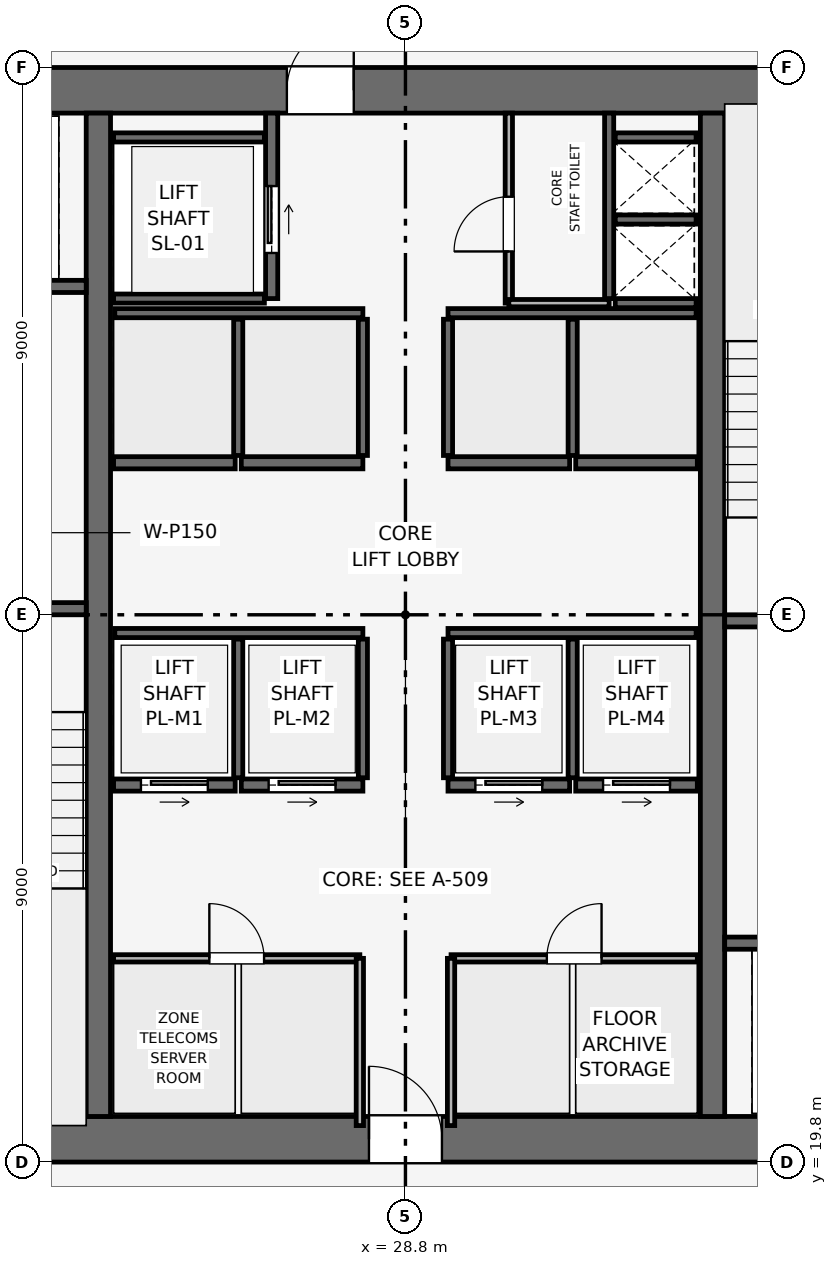
"""IFC4 building model, lengths in metres.
Left out: names, types, materials, properties, quantities, classifications, styles, units other than length and angle.
Written with IfcOpenShell. Run it as: python <this file> out.ifc"""

import sys

from ifc_helpers import new_model, si_unit, direction, frame, frame_2d, origin, place, context, subcontext, project, spatial, rectangle, extrude, element, fill, save


model = new_model("IFC4")
c1 = context("Model", 3, precision=1e-05, world=origin(), true_north=direction((0.0, 1.0)))
c2 = subcontext(c1, "Body", "Model", "MODEL_VIEW")
j1 = project(units=[si_unit("LENGTHUNIT", "METRE"), si_unit("PLANEANGLEUNIT", "RADIAN")], contexts=[c1])
p1 = place(None, origin())
s1 = spatial("IfcSite", under=j1, at=p1, CompositionType="ELEMENT")
p2 = place(p1, origin())
s2 = spatial("IfcBuilding", under=s1, at=p2, CompositionType="ELEMENT")
p3 = place(p2, frame((0.0, 0.0, 207.45)))
s3 = spatial("IfcBuildingStorey", under=s2, at=p3, CompositionType="ELEMENT", Elevation=207.45)
p4 = place(p3, frame((19.8, 20.175, 0.0), z_axis=(0.0, 0.0, 1.0), x_axis=(1.0, 0.0, 0.0)))
e1 = element("IfcWall", 1, at=p4, inside=s3, PredefinedType="SHEAR", context=c2, shape_type="SweptSolid", body=[
    extrude(rectangle(XDim=18.0, YDim=0.75, at=frame_2d((9.0, 0.0))), origin(), (0.0, 0.0, 1.0), 3.75),
])
p5 = place(p4, frame((8.4, 0.0, 0.0)))
e2 = element("IfcOpeningElement", 2, at=p5, cuts=e1, PredefinedType="OPENING", context=c2, shape_type="SweptSolid", body=[
    extrude(rectangle(XDim=1.2, YDim=2.2, at=frame_2d((0.6, 1.1))), frame((0.0, 0.385, 0.0), z_axis=(0.0, -1.0, 0.0), x_axis=(1.0, 0.0, 0.0)), (0.0, 0.0, 1.0), 0.77),
])
p6 = place(p3, frame((19.8, 37.425, 0.0), z_axis=(0.0, 0.0, 1.0), x_axis=(1.0, 0.0, 0.0)))
e3 = element("IfcWall", 3, at=p6, inside=s3, PredefinedType="SHEAR", context=c2, shape_type="SweptSolid", body=[
    extrude(rectangle(XDim=18.0, YDim=0.75, at=frame_2d((9.0, 0.0))), origin(), (0.0, 0.0, 1.0), 3.75),
])
p7 = place(p6, frame((7.05, 0.0, 0.0)))
e4 = element("IfcOpeningElement", 4, at=p7, cuts=e3, PredefinedType="OPENING", context=c2, shape_type="SweptSolid", body=[
    extrude(rectangle(XDim=1.1, YDim=2.15, at=frame_2d((0.55, 1.075))), frame((0.0, 0.385, 0.0), z_axis=(0.0, -1.0, 0.0), x_axis=(1.0, 0.0, 0.0)), (0.0, 0.0, 1.0), 0.77),
])
for number, where, z_axis, x_axis in (
    (5, (23.75, 20.55, 0.0), (0.0, 0.0, 1.0), (0.0, 1.0, 0.0)),
    (6, (33.85, 20.55, 0.0), (0.0, 0.0, 1.0), (0.0, 1.0, 0.0)),
):
    element("IfcWall", number, at=place(p3, frame(where, z_axis=z_axis, x_axis=x_axis)), inside=s3, PredefinedType="SHEAR", context=c2, shape_type="SweptSolid", body=[
        extrude(rectangle(XDim=16.5, YDim=0.4, at=frame_2d((8.25, 0.0))), origin(), (0.0, 0.0, 1.0), 3.75),
    ])
p8 = place(p3, frame((20.4, 28.9, 0.0), z_axis=(0.0, 0.0, 1.0), x_axis=(1.0, 0.0, 0.0)))
e7 = element("IfcWall", 7, at=p8, inside=s3, PredefinedType="SHEAR", context=c2, shape_type="SweptSolid", body=[
    extrude(rectangle(XDim=3.15, YDim=0.2, at=frame_2d((1.575, 0.0))), origin(), (0.0, 0.0, 1.0), 3.5),
])
p9 = place(p8, frame((0.8, 0.0, 0.0)))
e8 = element("IfcOpeningElement", 8, at=p9, cuts=e7, PredefinedType="OPENING", context=c2, shape_type="SweptSolid", body=[
    extrude(rectangle(XDim=1.0, YDim=2.1, at=frame_2d((0.5, 1.05))), frame((0.0, 0.11, 0.0), z_axis=(0.0, -1.0, 0.0), x_axis=(1.0, 0.0, 0.0)), (0.0, 0.0, 1.0), 0.22),
])
p10 = place(p3, frame((34.05, 28.7, 0.0), z_axis=(0.0, 0.0, 1.0), x_axis=(1.0, 0.0, 0.0)))
e9 = element("IfcWall", 9, at=p10, inside=s3, PredefinedType="SHEAR", context=c2, shape_type="SweptSolid", body=[
    extrude(rectangle(XDim=3.15, YDim=0.2, at=frame_2d((1.575, 0.0))), origin(), (0.0, 0.0, 1.0), 3.5),
])
p11 = place(p10, frame((0.8, 0.0, 0.0)))
e10 = element("IfcOpeningElement", 10, at=p11, cuts=e9, PredefinedType="OPENING", context=c2, shape_type="SweptSolid", body=[
    extrude(rectangle(XDim=1.0, YDim=2.1, at=frame_2d((0.5, 1.05))), frame((0.0, 0.11, 0.0), z_axis=(0.0, -1.0, 0.0), x_axis=(1.0, 0.0, 0.0)), (0.0, 0.0, 1.0), 0.22),
])
p12 = place(p3, frame((32.15, 34.0, 0.0), z_axis=(0.0, 0.0, 1.0), x_axis=(0.0, 1.0, 0.0)))
e11 = element("IfcWall", 11, at=p12, inside=s3, PredefinedType="SHEAR", context=c2, shape_type="SweptSolid", body=[
    extrude(rectangle(XDim=3.05, YDim=0.15, at=frame_2d((1.525, 0.0))), origin(), (0.0, 0.0, 1.0), 3.5),
])
for number, where, z_axis, x_axis in (
    (12, (32.25, 33.925, 0.0), (0.0, 0.0, 1.0), (1.0, 0.0, 0.0)),
    (13, (32.25, 35.3, 0.0), (0.0, 0.0, 1.0), (1.0, 0.0, 0.0)),
):
    element("IfcWall", number, at=place(p3, frame(where, z_axis=z_axis, x_axis=x_axis)), inside=s3, PredefinedType="SHEAR", context=c2, shape_type="SweptSolid", body=[
        extrude(rectangle(XDim=1.33, YDim=0.15, at=frame_2d((0.665, 0.0))), origin(), (0.0, 0.0, 1.0), 3.5),
    ])
p13 = place(p3, frame((20.5, 34.2, 0.0), z_axis=(0.0, 0.0, 1.0), x_axis=(1.0, 0.0, 0.0)))
e14 = element("IfcWall", 14, at=p13, inside=s3, PredefinedType="SHEAR", context=c2, shape_type="SweptSolid", body=[
    extrude(rectangle(XDim=3.05, YDim=0.2, at=frame_2d((1.525, 0.0))), origin(), (0.0, 0.0, 1.0), 3.5),
])
p14 = place(p13, frame((0.75, 0.0, 0.0)))
e15 = element("IfcOpeningElement", 15, at=p14, cuts=e14, PredefinedType="OPENING", context=c2, shape_type="SweptSolid", body=[
    extrude(rectangle(XDim=1.1, YDim=2.15, at=frame_2d((0.55, 1.075))), frame((0.0, 0.11, 0.0), z_axis=(0.0, -1.0, 0.0), x_axis=(1.0, 0.0, 0.0)), (0.0, 0.0, 1.0), 0.22),
])
p15 = place(p3, frame((34.05, 23.4, 0.0), z_axis=(0.0, 0.0, 1.0), x_axis=(1.0, 0.0, 0.0)))
e16 = element("IfcWall", 16, at=p15, inside=s3, PredefinedType="SHEAR", context=c2, shape_type="SweptSolid", body=[
    extrude(rectangle(XDim=3.05, YDim=0.2, at=frame_2d((1.525, 0.0))), origin(), (0.0, 0.0, 1.0), 3.5),
])
p16 = place(p15, frame((1.2, 0.0, 0.0)))
e17 = element("IfcOpeningElement", 17, at=p16, cuts=e16, PredefinedType="OPENING", context=c2, shape_type="SweptSolid", body=[
    extrude(rectangle(XDim=1.1, YDim=2.15, at=frame_2d((0.55, 1.075))), frame((0.0, 0.11, 0.0), z_axis=(0.0, -1.0, 0.0), x_axis=(1.0, 0.0, 0.0)), (0.0, 0.0, 1.0), 0.22),
])
p17 = place(p3, frame((26.6, 34.0, 0.0), z_axis=(0.0, 0.0, 1.0), x_axis=(0.0, 1.0, 0.0)))
e18 = element("IfcWall", 18, at=p17, inside=s3, PredefinedType="SHEAR", context=c2, shape_type="SweptSolid", body=[
    extrude(rectangle(XDim=3.05, YDim=0.2, at=frame_2d((1.525, 0.0))), origin(), (0.0, 0.0, 1.0), 3.5),
])
p18 = place(p17, frame((0.75, 0.0, 0.0)))
e19 = element("IfcOpeningElement", 19, at=p18, cuts=e18, PredefinedType="OPENING", context=c2, shape_type="SweptSolid", body=[
    extrude(rectangle(XDim=1.1, YDim=2.15, at=frame_2d((0.55, 1.075))), frame((0.0, 0.11, 0.0), z_axis=(0.0, -1.0, 0.0), x_axis=(1.0, 0.0, 0.0)), (0.0, 0.0, 1.0), 0.22),
])
for number, where, z_axis, x_axis in (
    (20, (24.0, 34.0, 0.0), (0.0, 0.0, 1.0), (1.0, 0.0, 0.0)),
    (21, (24.0, 36.65, 0.0), (0.0, 0.0, 1.0), (1.0, 0.0, 0.0)),
):
    element("IfcWall", number, at=place(p3, frame(where, z_axis=z_axis, x_axis=x_axis)), inside=s3, PredefinedType="SHEAR", context=c2, shape_type="SweptSolid", body=[
        extrude(rectangle(XDim=2.48, YDim=0.15, at=frame_2d((1.24, 0.0))), origin(), (0.0, 0.0, 1.0), 3.5),
    ])
p19 = place(p3, frame((24.0, 26.0, 0.0), z_axis=(0.0, 0.0, 1.0), x_axis=(1.0, 0.0, 0.0)))
e22 = element("IfcWall", 22, at=p19, inside=s3, PredefinedType="SHEAR", context=c2, shape_type="SweptSolid", body=[
    extrude(rectangle(XDim=2.0, YDim=0.2, at=frame_2d((1.0, 0.0))), origin(), (0.0, 0.0, 1.0), 3.5),
])
p20 = place(p19, frame((0.45, 0.0, 0.0)))
e23 = element("IfcOpeningElement", 23, at=p20, cuts=e22, PredefinedType="OPENING", context=c2, shape_type="SweptSolid", body=[
    extrude(rectangle(XDim=1.1, YDim=2.15, at=frame_2d((0.55, 1.075))), frame((0.0, 0.11, 0.0), z_axis=(0.0, -1.0, 0.0), x_axis=(1.0, 0.0, 0.0)), (0.0, 0.0, 1.0), 0.22),
])
p21 = place(p3, frame((26.1, 26.0, 0.0), z_axis=(0.0, 0.0, 1.0), x_axis=(1.0, 0.0, 0.0)))
e24 = element("IfcWall", 24, at=p21, inside=s3, PredefinedType="SHEAR", context=c2, shape_type="SweptSolid", body=[
    extrude(rectangle(XDim=2.0, YDim=0.2, at=frame_2d((1.0, 0.0))), origin(), (0.0, 0.0, 1.0), 3.5),
])
p22 = place(p21, frame((0.45, 0.0, 0.0)))
e25 = element("IfcOpeningElement", 25, at=p22, cuts=e24, PredefinedType="OPENING", context=c2, shape_type="SweptSolid", body=[
    extrude(rectangle(XDim=1.1, YDim=2.15, at=frame_2d((0.55, 1.075))), frame((0.0, 0.11, 0.0), z_axis=(0.0, -1.0, 0.0), x_axis=(1.0, 0.0, 0.0)), (0.0, 0.0, 1.0), 0.22),
])
p23 = place(p3, frame((29.5, 26.0, 0.0), z_axis=(0.0, 0.0, 1.0), x_axis=(1.0, 0.0, 0.0)))
e26 = element("IfcWall", 26, at=p23, inside=s3, PredefinedType="SHEAR", context=c2, shape_type="SweptSolid", body=[
    extrude(rectangle(XDim=2.0, YDim=0.2, at=frame_2d((1.0, 0.0))), origin(), (0.0, 0.0, 1.0), 3.5),
])
p24 = place(p23, frame((0.45, 0.0, 0.0)))
e27 = element("IfcOpeningElement", 27, at=p24, cuts=e26, PredefinedType="OPENING", context=c2, shape_type="SweptSolid", body=[
    extrude(rectangle(XDim=1.1, YDim=2.15, at=frame_2d((0.55, 1.075))), frame((0.0, 0.11, 0.0), z_axis=(0.0, -1.0, 0.0), x_axis=(1.0, 0.0, 0.0)), (0.0, 0.0, 1.0), 0.22),
])
p25 = place(p3, frame((31.6, 26.0, 0.0), z_axis=(0.0, 0.0, 1.0), x_axis=(1.0, 0.0, 0.0)))
e28 = element("IfcWall", 28, at=p25, inside=s3, PredefinedType="SHEAR", context=c2, shape_type="SweptSolid", body=[
    extrude(rectangle(XDim=2.0, YDim=0.2, at=frame_2d((1.0, 0.0))), origin(), (0.0, 0.0, 1.0), 3.5),
])
p26 = place(p25, frame((0.45, 0.0, 0.0)))
e29 = element("IfcOpeningElement", 29, at=p26, cuts=e28, PredefinedType="OPENING", context=c2, shape_type="SweptSolid", body=[
    extrude(rectangle(XDim=1.1, YDim=2.15, at=frame_2d((0.55, 1.075))), frame((0.0, 0.11, 0.0), z_axis=(0.0, -1.0, 0.0), x_axis=(1.0, 0.0, 0.0)), (0.0, 0.0, 1.0), 0.22),
])
for number, where, z_axis, x_axis in (
    (30, (24.0, 31.3, 0.0), (0.0, 0.0, 1.0), (1.0, 0.0, 0.0)),
    (31, (26.1, 31.3, 0.0), (0.0, 0.0, 1.0), (1.0, 0.0, 0.0)),
    (32, (29.5, 31.3, 0.0), (0.0, 0.0, 1.0), (1.0, 0.0, 0.0)),
    (33, (31.6, 31.3, 0.0), (0.0, 0.0, 1.0), (1.0, 0.0, 0.0)),
):
    element("IfcWall", number, at=place(p3, frame(where, z_axis=z_axis, x_axis=x_axis)), inside=s3, PredefinedType="SHEAR", context=c2, shape_type="SweptSolid", body=[
        extrude(rectangle(XDim=2.0, YDim=0.2, at=frame_2d((1.0, 0.0))), origin(), (0.0, 0.0, 1.0), 3.5),
    ])
p27 = place(p3, frame((32.25, 36.65, 0.0), z_axis=(0.0, 0.0, 1.0), x_axis=(1.0, 0.0, 0.0)))
e34 = element("IfcWall", 34, at=p27, inside=s3, PredefinedType="SHEAR", context=c2, shape_type="SweptSolid", body=[
    extrude(rectangle(XDim=1.33, YDim=0.15, at=frame_2d((0.665, 0.0))), origin(), (0.0, 0.0, 1.0), 3.5),
])
for number, where, z_axis, x_axis in (
    (35, (24.02, 28.5, 0.0), (0.0, 0.0, 1.0), (1.0, 0.0, 0.0)),
    (36, (29.5, 28.5, 0.0), (0.0, 0.0, 1.0), (1.0, 0.0, 0.0)),
):
    element("IfcWall", number, at=place(p3, frame(where, z_axis=z_axis, x_axis=x_axis)), inside=s3, PredefinedType="SHEAR", context=c2, shape_type="SweptSolid", body=[
        extrude(rectangle(XDim=4.08, YDim=0.15, at=frame_2d((2.04, 0.0))), origin(), (0.0, 0.0, 1.0), 3.5),
    ])
for number, where, z_axis, x_axis in (
    (37, (26.05, 26.12, 0.0), (0.0, 0.0, 1.0), (0.0, 1.0, 0.0)),
    (38, (28.1, 26.12, 0.0), (0.0, 0.0, 1.0), (0.0, 1.0, 0.0)),
    (39, (29.5, 26.12, 0.0), (0.0, 0.0, 1.0), (0.0, 1.0, 0.0)),
    (40, (31.55, 26.12, 0.0), (0.0, 0.0, 1.0), (0.0, 1.0, 0.0)),
):
    element("IfcWall", number, at=place(p3, frame(where, z_axis=z_axis, x_axis=x_axis)), inside=s3, PredefinedType="SHEAR", context=c2, shape_type="SweptSolid", body=[
        extrude(rectangle(XDim=2.28, YDim=0.15, at=frame_2d((1.14, 0.0))), origin(), (0.0, 0.0, 1.0), 3.5),
    ])
for number, where, z_axis, x_axis in (
    (41, (24.02, 33.76, 0.0), (0.0, 0.0, 1.0), (1.0, 0.0, 0.0)),
    (42, (29.5, 33.76, 0.0), (0.0, 0.0, 1.0), (1.0, 0.0, 0.0)),
):
    element("IfcWall", number, at=place(p3, frame(where, z_axis=z_axis, x_axis=x_axis)), inside=s3, PredefinedType="SHEAR", context=c2, shape_type="SweptSolid", body=[
        extrude(rectangle(XDim=4.08, YDim=0.15, at=frame_2d((2.04, 0.0))), origin(), (0.0, 0.0, 1.0), 3.5),
    ])
for number, where, z_axis, x_axis in (
    (43, (26.05, 31.42, 0.0), (0.0, 0.0, 1.0), (0.0, 1.0, 0.0)),
    (44, (28.1, 31.42, 0.0), (0.0, 0.0, 1.0), (0.0, 1.0, 0.0)),
    (45, (29.5, 31.42, 0.0), (0.0, 0.0, 1.0), (0.0, 1.0, 0.0)),
    (46, (31.55, 31.42, 0.0), (0.0, 0.0, 1.0), (0.0, 1.0, 0.0)),
):
    element("IfcWall", number, at=place(p3, frame(where, z_axis=z_axis, x_axis=x_axis)), inside=s3, PredefinedType="SHEAR", context=c2, shape_type="SweptSolid", body=[
        extrude(rectangle(XDim=2.24, YDim=0.15, at=frame_2d((1.12, 0.0))), origin(), (0.0, 0.0, 1.0), 3.5),
    ])
p28 = place(p3, frame((30.5, 33.925, 0.0), z_axis=(0.0, 0.0, 1.0), x_axis=(0.0, 1.0, 0.0)))
e47 = element("IfcWall", 47, at=p28, inside=s3, PredefinedType="PARTITIONING", context=c2, shape_type="SweptSolid", body=[
    extrude(rectangle(XDim=3.125, YDim=0.12, at=frame_2d((1.562, 0.0))), origin(), (0.0, 0.0, 1.0), 3.5),
])
p29 = place(p28, frame((0.85, 0.0, 0.0)))
e48 = element("IfcOpeningElement", 48, at=p29, cuts=e47, PredefinedType="OPENING", context=c2, shape_type="SweptSolid", body=[
    extrude(rectangle(XDim=0.9, YDim=2.1, at=frame_2d((0.45, 1.05))), frame((0.0, 0.07, 0.0), z_axis=(0.0, -1.0, 0.0), x_axis=(1.0, 0.0, 0.0)), (0.0, 0.0, 1.0), 0.14),
])
p30 = place(p3, frame((30.5, 33.925, 0.0), z_axis=(0.0, 0.0, 1.0), x_axis=(1.0, 0.0, 0.0)))
e49 = element("IfcWall", 49, at=p30, inside=s3, PredefinedType="PARTITIONING", context=c2, shape_type="SweptSolid", body=[
    extrude(rectangle(XDim=1.65, YDim=0.12, at=frame_2d((0.825, 0.0))), origin(), (0.0, 0.0, 1.0), 3.5),
])
p31 = place(p3, frame((24.0, 23.15, 0.0), z_axis=(0.0, 0.0, 1.0), x_axis=(1.0, 0.0, 0.0)))
e50 = element("IfcWall", 50, at=p31, inside=s3, PredefinedType="PARTITIONING", context=c2, shape_type="SweptSolid", body=[
    extrude(rectangle(XDim=4.05, YDim=0.12, at=frame_2d((2.025, 0.0))), origin(), (0.0, 0.0, 1.0), 3.5),
])
p32 = place(p31, frame((1.575, 0.0, 0.0)))
e51 = element("IfcOpeningElement", 51, at=p32, cuts=e50, PredefinedType="OPENING", context=c2, shape_type="SweptSolid", body=[
    extrude(rectangle(XDim=0.9, YDim=2.1, at=frame_2d((0.45, 1.05))), frame((0.0, 0.07, 0.0), z_axis=(0.0, -1.0, 0.0), x_axis=(1.0, 0.0, 0.0)), (0.0, 0.0, 1.0), 0.14),
])
p33 = place(p3, frame((28.05, 20.4, 0.0), z_axis=(0.0, 0.0, 1.0), x_axis=(0.0, 1.0, 0.0)))
e52 = element("IfcWall", 52, at=p33, inside=s3, PredefinedType="PARTITIONING", context=c2, shape_type="SweptSolid", body=[
    extrude(rectangle(XDim=2.75, YDim=0.12, at=frame_2d((1.375, 0.0))), origin(), (0.0, 0.0, 1.0), 3.5),
])
p34 = place(p3, frame((29.55, 23.15, 0.0), z_axis=(0.0, 0.0, 1.0), x_axis=(1.0, 0.0, 0.0)))
e53 = element("IfcWall", 53, at=p34, inside=s3, PredefinedType="PARTITIONING", context=c2, shape_type="SweptSolid", body=[
    extrude(rectangle(XDim=4.05, YDim=0.12, at=frame_2d((2.025, 0.0))), origin(), (0.0, 0.0, 1.0), 3.5),
])
p35 = place(p34, frame((1.575, 0.0, 0.0)))
e54 = element("IfcOpeningElement", 54, at=p35, cuts=e53, PredefinedType="OPENING", context=c2, shape_type="SweptSolid", body=[
    extrude(rectangle(XDim=0.9, YDim=2.1, at=frame_2d((0.45, 1.05))), frame((0.0, 0.07, 0.0), z_axis=(0.0, -1.0, 0.0), x_axis=(1.0, 0.0, 0.0)), (0.0, 0.0, 1.0), 0.14),
])
p36 = place(p3, frame((29.55, 20.4, 0.0), z_axis=(0.0, 0.0, 1.0), x_axis=(0.0, 1.0, 0.0)))
e55 = element("IfcWall", 55, at=p36, inside=s3, PredefinedType="PARTITIONING", context=c2, shape_type="SweptSolid", body=[
    extrude(rectangle(XDim=2.75, YDim=0.12, at=frame_2d((1.375, 0.0))), origin(), (0.0, 0.0, 1.0), 3.5),
])
p37 = place(p18, origin())
e56 = element("IfcDoor", 56, at=p37, inside=s3, OperationType="SLIDING_TO_RIGHT", PredefinedType="DOOR", context=c2, shape_type="SweptSolid", body=[
    extrude(rectangle(XDim=1.1, YDim=2.15, at=frame_2d((0.55, 1.075))), frame((0.0, 0.025, 0.0), z_axis=(0.0, -1.0, 0.0), x_axis=(1.0, 0.0, 0.0)), (0.0, 0.0, 1.0), 0.05),
])
fill(e19, e56)
p38 = place(p20, origin())
e57 = element("IfcDoor", 57, at=p38, inside=s3, OperationType="SLIDING_TO_RIGHT", PredefinedType="DOOR", context=c2, shape_type="SweptSolid", body=[
    extrude(rectangle(XDim=1.1, YDim=2.15, at=frame_2d((0.55, 1.075))), frame((0.0, 0.025, 0.0), z_axis=(0.0, -1.0, 0.0), x_axis=(1.0, 0.0, 0.0)), (0.0, 0.0, 1.0), 0.05),
])
fill(e23, e57)
p39 = place(p22, origin())
e58 = element("IfcDoor", 58, at=p39, inside=s3, OperationType="SLIDING_TO_RIGHT", PredefinedType="DOOR", context=c2, shape_type="SweptSolid", body=[
    extrude(rectangle(XDim=1.1, YDim=2.15, at=frame_2d((0.55, 1.075))), frame((0.0, 0.025, 0.0), z_axis=(0.0, -1.0, 0.0), x_axis=(1.0, 0.0, 0.0)), (0.0, 0.0, 1.0), 0.05),
])
fill(e25, e58)
p40 = place(p24, origin())
e59 = element("IfcDoor", 59, at=p40, inside=s3, OperationType="SLIDING_TO_RIGHT", PredefinedType="DOOR", context=c2, shape_type="SweptSolid", body=[
    extrude(rectangle(XDim=1.1, YDim=2.15, at=frame_2d((0.55, 1.075))), frame((0.0, 0.025, 0.0), z_axis=(0.0, -1.0, 0.0), x_axis=(1.0, 0.0, 0.0)), (0.0, 0.0, 1.0), 0.05),
])
fill(e27, e59)
p41 = place(p26, origin())
e60 = element("IfcDoor", 60, at=p41, inside=s3, OperationType="SLIDING_TO_RIGHT", PredefinedType="DOOR", context=c2, shape_type="SweptSolid", body=[
    extrude(rectangle(XDim=1.1, YDim=2.15, at=frame_2d((0.55, 1.075))), frame((0.0, 0.025, 0.0), z_axis=(0.0, -1.0, 0.0), x_axis=(1.0, 0.0, 0.0)), (0.0, 0.0, 1.0), 0.05),
])
fill(e29, e60)
p42 = place(p29, origin())
e61 = element("IfcDoor", 61, at=p42, inside=s3, OperationType="SINGLE_SWING_LEFT", PredefinedType="DOOR", context=c2, shape_type="SweptSolid", body=[
    extrude(rectangle(XDim=0.9, YDim=2.1, at=frame_2d((0.45, 1.05))), frame((0.0, 0.025, 0.0), z_axis=(0.0, -1.0, 0.0), x_axis=(1.0, 0.0, 0.0)), (0.0, 0.0, 1.0), 0.05),
])
fill(e48, e61)
p43 = place(p32, origin())
e62 = element("IfcDoor", 62, at=p43, inside=s3, OperationType="SINGLE_SWING_LEFT", PredefinedType="DOOR", context=c2, shape_type="SweptSolid", body=[
    extrude(rectangle(XDim=0.9, YDim=2.1, at=frame_2d((0.45, 1.05))), frame((0.0, 0.025, 0.0), z_axis=(0.0, -1.0, 0.0), x_axis=(1.0, 0.0, 0.0)), (0.0, 0.0, 1.0), 0.05),
])
fill(e51, e62)
p44 = place(p35, origin())
e63 = element("IfcDoor", 63, at=p44, inside=s3, OperationType="SINGLE_SWING_RIGHT", PredefinedType="DOOR", context=c2, shape_type="SweptSolid", body=[
    extrude(rectangle(XDim=0.9, YDim=2.1, at=frame_2d((0.45, 1.05))), frame((0.0, 0.025, 0.0), z_axis=(0.0, -1.0, 0.0), x_axis=(1.0, 0.0, 0.0)), (0.0, 0.0, 1.0), 0.05),
])
fill(e54, e63)
p45 = place(p5, origin())
e64 = element("IfcDoor", 64, at=p45, inside=s3, OperationType="SINGLE_SWING_LEFT", PredefinedType="DOOR", context=c2, shape_type="SweptSolid", body=[
    extrude(rectangle(XDim=1.2, YDim=2.2, at=frame_2d((0.6, 1.1))), frame((0.0, 0.025, 0.0), z_axis=(0.0, -1.0, 0.0), x_axis=(1.0, 0.0, 0.0)), (0.0, 0.0, 1.0), 0.05),
])
fill(e2, e64)
p46 = place(p7, origin())
e65 = element("IfcDoor", 65, at=p46, inside=s3, OperationType="SINGLE_SWING_RIGHT", PredefinedType="DOOR", context=c2, shape_type="SweptSolid", body=[
    extrude(rectangle(XDim=1.1, YDim=2.15, at=frame_2d((0.55, 1.075))), frame((0.0, 0.025, 0.0), z_axis=(0.0, -1.0, 0.0), x_axis=(1.0, 0.0, 0.0)), (0.0, 0.0, 1.0), 0.05),
])
fill(e4, e65)
save(model, sys.argv[1])
